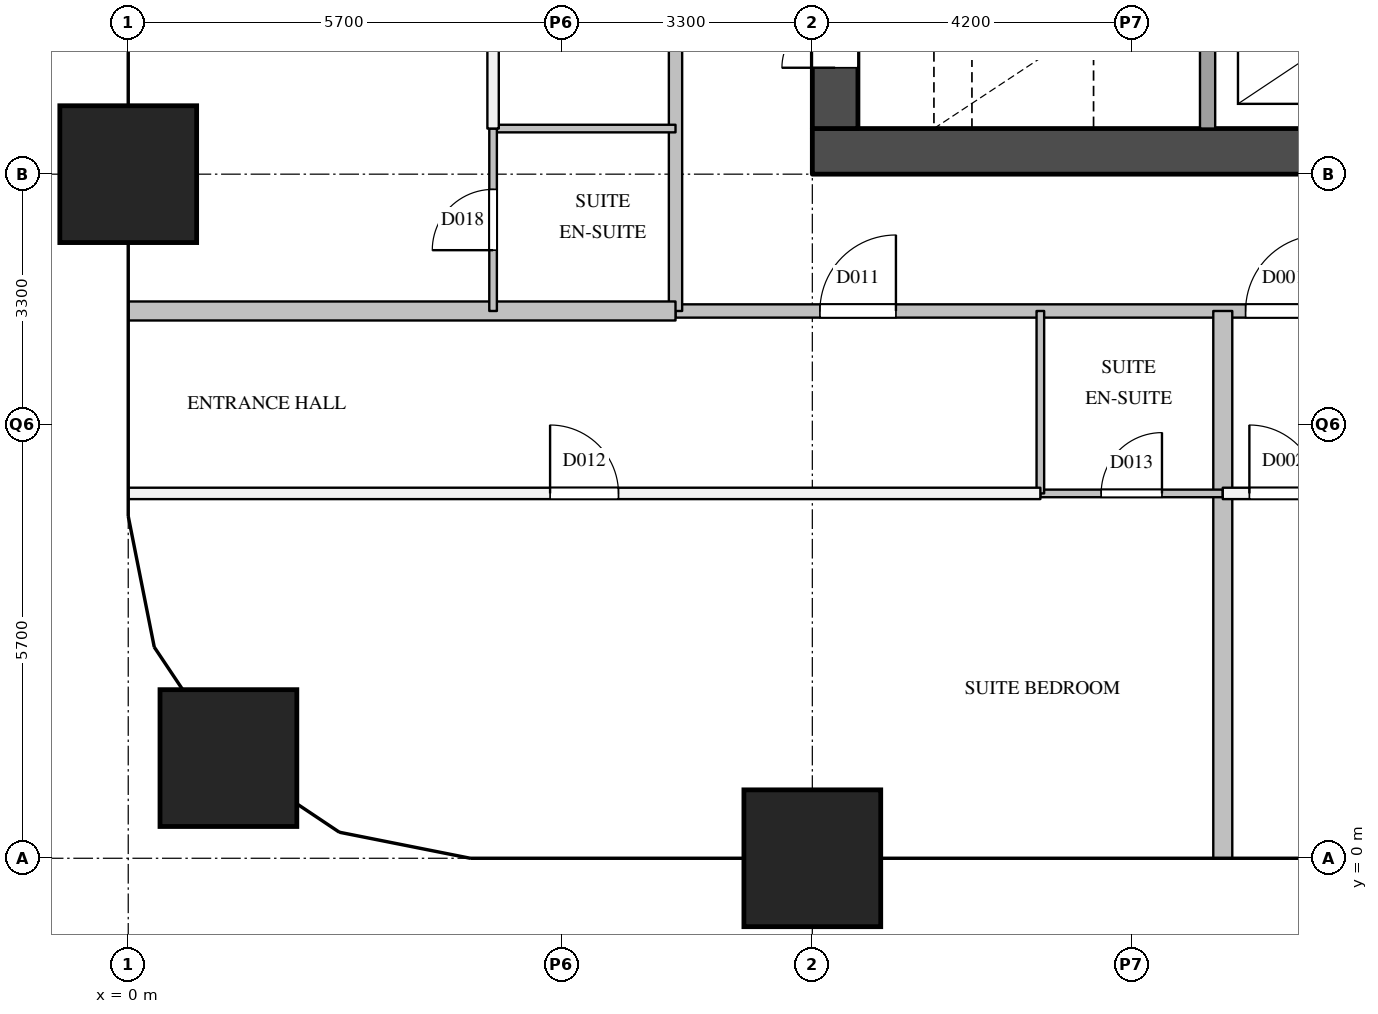
"""IFC4 building model, lengths in metres.
Left out: names, types, materials, properties, quantities, classifications, styles, units other than length and angle.
Written with IfcOpenShell. Run it as: python <this file> out.ifc"""

import sys

from ifc_helpers import new_model, si_unit, direction, frame, frame_2d, origin, origin_2d, place, context, subcontext, project, spatial, rectangle, extrude, element, fill, save


model = new_model("IFC4")
c1 = context("Model", 3, precision=1e-05, world=origin(), true_north=direction((0.0, 1.0)))
c2 = subcontext(c1, "Body", "Model", "MODEL_VIEW")
j1 = project(units=[si_unit("LENGTHUNIT", "METRE"), si_unit("PLANEANGLEUNIT", "RADIAN")], contexts=[c1])
p1 = place(None, origin())
s1 = spatial("IfcSite", under=j1, at=p1, CompositionType="ELEMENT")
p2 = place(p1, origin())
s2 = spatial("IfcBuilding", under=s1, at=p2, CompositionType="ELEMENT")
p3 = place(p2, frame((0.0, 0.0, 57.6)))
s3 = spatial("IfcBuildingStorey", under=s2, at=p3, CompositionType="ELEMENT", Elevation=57.6)
for number, where, z_axis, x_axis in (
    (1, (1.318, 1.318, 0.0), (0.0, 0.0, 1.0), (1.0, 0.0, 0.0)),
    (2, (0.0, 9.0, 0.0), (0.0, 0.0, 1.0), (1.0, 0.0, 0.0)),
    (3, (9.0, 0.0, 0.0), (0.0, 0.0, 1.0), (1.0, 0.0, 0.0)),
):
    element("IfcColumn", number, at=place(p3, frame(where, z_axis=z_axis, x_axis=x_axis)), inside=s3, PredefinedType="COLUMN", context=c2, shape_type="SweptSolid", body=[
        extrude(rectangle(XDim=1.8, YDim=1.8, at=origin_2d()), origin(), (0.0, 0.0, 1.0), 3.8),
    ])
p4 = place(p3, frame((9.0, 9.3, 0.0), z_axis=(0.0, 0.0, 1.0), x_axis=(1.0, 0.0, 0.0)))
e4 = element("IfcWall", 4, at=p4, inside=s3, PredefinedType="SHEAR", context=c2, shape_type="SweptSolid", body=[
    extrude(rectangle(XDim=9.0, YDim=0.6, at=frame_2d((4.5, 0.0))), origin(), (0.0, 0.0, 1.0), 3.5),
])
p5 = place(p3, frame((9.3, 9.6, 0.0), z_axis=(0.0, 0.0, 1.0), x_axis=(0.0, 1.0, 0.0)))
e5 = element("IfcWall", 5, at=p5, inside=s3, PredefinedType="SHEAR", context=c2, shape_type="SweptSolid", body=[
    extrude(rectangle(XDim=12.3, YDim=0.6, at=frame_2d((6.15, 0.0))), origin(), (0.0, 0.0, 1.0), 3.5),
])
p6 = place(p5, frame((0.8, 0.0, 0.0)))
e6 = element("IfcOpeningElement", 6, at=p6, cuts=e5, PredefinedType="OPENING", context=c2, shape_type="SweptSolid", body=[
    extrude(rectangle(XDim=0.7, YDim=2.1, at=frame_2d((0.35, 1.05))), frame((0.0, 0.31, 0.0), z_axis=(0.0, -1.0, 0.0), x_axis=(1.0, 0.0, 0.0)), (0.0, 0.0, 1.0), 0.62),
])
p7 = place(p5, frame((4.8, 0.0, 0.0)))
e7 = element("IfcOpeningElement", 7, at=p7, cuts=e5, PredefinedType="OPENING", context=c2, shape_type="SweptSolid", body=[
    extrude(rectangle(XDim=1.0, YDim=2.1, at=frame_2d((0.5, 1.05))), frame((0.0, 0.31, 0.0), z_axis=(0.0, -1.0, 0.0), x_axis=(1.0, 0.0, 0.0)), (0.0, 0.0, 1.0), 0.62),
])
p8 = place(p3, frame((14.2, 9.6, 0.0), z_axis=(0.0, 0.0, 1.0), x_axis=(0.0, 1.0, 0.0)))
e8 = element("IfcWall", 8, at=p8, inside=s3, PredefinedType="SOLIDWALL", context=c2, shape_type="SweptSolid", body=[
    extrude(rectangle(XDim=2.3, YDim=0.2, at=frame_2d((1.15, 0.0))), origin(), (0.0, 0.0, 1.0), 3.5),
])
p9 = place(p3, frame((7.2, 7.2, 0.0), z_axis=(0.0, 0.0, 1.0), x_axis=(1.0, 0.0, 0.0)))
e9 = element("IfcWall", 9, at=p9, inside=s3, PredefinedType="PARTITIONING", context=c2, shape_type="SweptSolid", body=[
    extrude(rectangle(XDim=12.6, YDim=0.175, at=frame_2d((6.3, 0.0))), origin(), (0.0, 0.0, 1.0), 3.5),
])
p10 = place(p9, frame((7.5, 0.0, 0.0)))
e10 = element("IfcOpeningElement", 10, at=p10, cuts=e9, PredefinedType="OPENING", context=c2, shape_type="SweptSolid", body=[
    extrude(rectangle(XDim=1.0, YDim=2.1, at=frame_2d((0.5, 1.05))), frame((0.0, 0.097, 0.0), z_axis=(0.0, -1.0, 0.0), x_axis=(1.0, 0.0, 0.0)), (0.0, 0.0, 1.0), 0.195),
])
p11 = place(p9, frame((1.9, 0.0, 0.0)))
e11 = element("IfcOpeningElement", 11, at=p11, cuts=e9, PredefinedType="OPENING", context=c2, shape_type="SweptSolid", body=[
    extrude(rectangle(XDim=1.0, YDim=2.1, at=frame_2d((0.5, 1.05))), frame((0.0, 0.097, 0.0), z_axis=(0.0, -1.0, 0.0), x_axis=(1.0, 0.0, 0.0)), (0.0, 0.0, 1.0), 0.195),
])
p12 = place(p3, frame((7.2, 7.2, 0.0), z_axis=(0.0, 0.0, 1.0), x_axis=(0.0, 1.0, 0.0)))
e12 = element("IfcWall", 12, at=p12, inside=s3, PredefinedType="PARTITIONING", context=c2, shape_type="SweptSolid", body=[
    extrude(rectangle(XDim=16.49, YDim=0.175, at=frame_2d((8.245, 0.0))), origin(), (0.0, 0.0, 1.0), 3.5),
])
p13 = place(p12, frame((6.1, 0.0, 0.0)))
e13 = element("IfcOpeningElement", 13, at=p13, cuts=e12, PredefinedType="OPENING", context=c2, shape_type="SweptSolid", body=[
    extrude(rectangle(XDim=1.0, YDim=2.1, at=frame_2d((0.5, 1.05))), frame((0.0, 0.097, 0.0), z_axis=(0.0, -1.0, 0.0), x_axis=(1.0, 0.0, 0.0)), (0.0, 0.0, 1.0), 0.195),
])
p14 = place(p12, frame((13.1, 0.0, 0.0)))
e14 = element("IfcOpeningElement", 14, at=p14, cuts=e12, PredefinedType="OPENING", context=c2, shape_type="SweptSolid", body=[
    extrude(rectangle(XDim=1.0, YDim=2.1, at=frame_2d((0.5, 1.05))), frame((0.0, 0.097, 0.0), z_axis=(0.0, -1.0, 0.0), x_axis=(1.0, 0.0, 0.0)), (0.0, 0.0, 1.0), 0.195),
])
p15 = place(p3, frame((0.0, 4.8, 0.0), z_axis=(0.0, 0.0, 1.0), x_axis=(1.0, 0.0, 0.0)))
e15 = element("IfcWall", 15, at=p15, inside=s3, PredefinedType="PARTITIONING", context=c2, shape_type="SweptSolid", body=[
    extrude(rectangle(XDim=12.0, YDim=0.15, at=frame_2d((6.0, 0.0))), origin(), (0.0, 0.0, 1.0), 2.5),
])
p16 = place(p15, frame((5.55, 0.0, 0.0)))
e16 = element("IfcOpeningElement", 16, at=p16, cuts=e15, PredefinedType="OPENING", context=c2, shape_type="SweptSolid", body=[
    extrude(rectangle(XDim=0.9, YDim=2.1, at=frame_2d((0.45, 1.05))), frame((0.0, 0.085, 0.0), z_axis=(0.0, -1.0, 0.0), x_axis=(1.0, 0.0, 0.0)), (0.0, 0.0, 1.0), 0.17),
])
p17 = place(p3, frame((14.4, 4.8, 0.0), z_axis=(0.0, 0.0, 1.0), x_axis=(1.0, 0.0, 0.0)))
e17 = element("IfcWall", 17, at=p17, inside=s3, PredefinedType="PARTITIONING", context=c2, shape_type="SweptSolid", body=[
    extrude(rectangle(XDim=1.6, YDim=0.15, at=frame_2d((0.8, 0.0))), origin(), (0.0, 0.0, 1.0), 3.5),
])
p18 = place(p17, frame((0.35, 0.0, 0.0)))
e18 = element("IfcOpeningElement", 18, at=p18, cuts=e17, PredefinedType="OPENING", context=c2, shape_type="SweptSolid", body=[
    extrude(rectangle(XDim=0.9, YDim=2.1, at=frame_2d((0.45, 1.05))), frame((0.0, 0.085, 0.0), z_axis=(0.0, -1.0, 0.0), x_axis=(1.0, 0.0, 0.0)), (0.0, 0.0, 1.0), 0.17),
])
p19 = place(p3, frame((4.8, 9.6, 0.0), z_axis=(0.0, 0.0, 1.0), x_axis=(0.0, 1.0, 0.0)))
e19 = element("IfcWall", 19, at=p19, inside=s3, PredefinedType="PARTITIONING", context=c2, shape_type="SweptSolid", body=[
    extrude(rectangle(XDim=8.4, YDim=0.15, at=frame_2d((4.2, 0.0))), origin(), (0.0, 0.0, 1.0), 3.5),
])
p20 = place(p19, frame((3.75, 0.0, 0.0)))
e20 = element("IfcOpeningElement", 20, at=p20, cuts=e19, PredefinedType="OPENING", context=c2, shape_type="SweptSolid", body=[
    extrude(rectangle(XDim=0.9, YDim=2.1, at=frame_2d((0.45, 1.05))), frame((0.0, 0.085, 0.0), z_axis=(0.0, -1.0, 0.0), x_axis=(1.0, 0.0, 0.0)), (0.0, 0.0, 1.0), 0.17),
])
for number, where, z_axis, x_axis in (
    (21, (0.0, 7.2, 0.0), (0.0, 0.0, 1.0), (1.0, 0.0, 0.0)),
    (22, (14.4, 0.0, 0.0), (0.0, 0.0, 1.0), (0.0, 1.0, 0.0)),
):
    element("IfcWall", number, at=place(p3, frame(where, z_axis=z_axis, x_axis=x_axis)), inside=s3, PredefinedType="PARTITIONING", context=c2, shape_type="SweptSolid", body=[
        extrude(rectangle(XDim=7.2, YDim=0.25, at=frame_2d((3.6, 0.0))), origin(), (0.0, 0.0, 1.0), 2.5),
    ])
p21 = place(p3, frame((12.0, 4.8, 0.0), z_axis=(0.0, 0.0, 1.0), x_axis=(1.0, 0.0, 0.0)))
e23 = element("IfcWall", 23, at=p21, inside=s3, PredefinedType="PARTITIONING", context=c2, shape_type="SweptSolid", body=[
    extrude(rectangle(XDim=2.4, YDim=0.1, at=frame_2d((1.2, 0.0))), origin(), (0.0, 0.0, 1.0), 3.5),
])
p22 = place(p21, frame((0.8, 0.0, 0.0)))
e24 = element("IfcOpeningElement", 24, at=p22, cuts=e23, PredefinedType="OPENING", context=c2, shape_type="SweptSolid", body=[
    extrude(rectangle(XDim=0.8, YDim=2.1, at=frame_2d((0.4, 1.05))), frame((0.0, 0.06, 0.0), z_axis=(0.0, -1.0, 0.0), x_axis=(1.0, 0.0, 0.0)), (0.0, 0.0, 1.0), 0.12),
])
p23 = place(p3, frame((4.8, 9.6, 0.0), z_axis=(0.0, 0.0, 1.0), x_axis=(1.0, 0.0, 0.0)))
e25 = element("IfcWall", 25, at=p23, inside=s3, PredefinedType="PARTITIONING", context=c2, shape_type="SweptSolid", body=[
    extrude(rectangle(XDim=2.4, YDim=0.1, at=frame_2d((1.2, 0.0))), origin(), (0.0, 0.0, 1.0), 3.5),
])
p24 = place(p3, frame((4.8, 7.2, 0.0), z_axis=(0.0, 0.0, 1.0), x_axis=(0.0, 1.0, 0.0)))
e26 = element("IfcWall", 26, at=p24, inside=s3, PredefinedType="PARTITIONING", context=c2, shape_type="SweptSolid", body=[
    extrude(rectangle(XDim=2.4, YDim=0.1, at=frame_2d((1.2, 0.0))), origin(), (0.0, 0.0, 1.0), 3.5),
])
p25 = place(p24, frame((0.8, 0.0, 0.0)))
e27 = element("IfcOpeningElement", 27, at=p25, cuts=e26, PredefinedType="OPENING", context=c2, shape_type="SweptSolid", body=[
    extrude(rectangle(XDim=0.8, YDim=2.1, at=frame_2d((0.4, 1.05))), frame((0.0, 0.06, 0.0), z_axis=(0.0, -1.0, 0.0), x_axis=(1.0, 0.0, 0.0)), (0.0, 0.0, 1.0), 0.12),
])
p26 = place(p3, frame((12.0, 4.8, 0.0), z_axis=(0.0, 0.0, 1.0), x_axis=(0.0, 1.0, 0.0)))
e28 = element("IfcWall", 28, at=p26, inside=s3, PredefinedType="PARTITIONING", context=c2, shape_type="SweptSolid", body=[
    extrude(rectangle(XDim=2.4, YDim=0.1, at=frame_2d((1.2, 0.0))), origin(), (0.0, 0.0, 1.0), 3.5),
])
p27 = place(p6, origin())
e29 = element("IfcDoor", 29, at=p27, inside=s3, OperationType="SINGLE_SWING_LEFT", PredefinedType="DOOR", context=c2, shape_type="SweptSolid", body=[
    extrude(rectangle(XDim=0.7, YDim=2.1, at=frame_2d((0.35, 1.05))), frame((0.0, 0.025, 0.0), z_axis=(0.0, -1.0, 0.0), x_axis=(1.0, 0.0, 0.0)), (0.0, 0.0, 1.0), 0.05),
])
fill(e6, e29)
p28 = place(p10, origin())
e30 = element("IfcDoor", 30, at=p28, inside=s3, OperationType="SINGLE_SWING_RIGHT", PredefinedType="DOOR", context=c2, shape_type="SweptSolid", body=[
    extrude(rectangle(XDim=1.0, YDim=2.1, at=frame_2d((0.5, 1.05))), frame((0.0, 0.025, 0.0), z_axis=(0.0, -1.0, 0.0), x_axis=(1.0, 0.0, 0.0)), (0.0, 0.0, 1.0), 0.05),
])
fill(e10, e30)
p29 = place(p18, origin())
e31 = element("IfcDoor", 31, at=p29, inside=s3, OperationType="SINGLE_SWING_LEFT", PredefinedType="DOOR", context=c2, shape_type="SweptSolid", body=[
    extrude(rectangle(XDim=0.9, YDim=2.1, at=frame_2d((0.45, 1.05))), frame((0.0, 0.025, 0.0), z_axis=(0.0, -1.0, 0.0), x_axis=(1.0, 0.0, 0.0)), (0.0, 0.0, 1.0), 0.05),
])
fill(e18, e31)
p30 = place(p11, origin())
e32 = element("IfcDoor", 32, at=p30, inside=s3, OperationType="SINGLE_SWING_RIGHT", PredefinedType="DOOR", context=c2, shape_type="SweptSolid", body=[
    extrude(rectangle(XDim=1.0, YDim=2.1, at=frame_2d((0.5, 1.05))), frame((0.0, 0.025, 0.0), z_axis=(0.0, -1.0, 0.0), x_axis=(1.0, 0.0, 0.0)), (0.0, 0.0, 1.0), 0.05),
])
fill(e11, e32)
p31 = place(p16, origin())
e33 = element("IfcDoor", 33, at=p31, inside=s3, OperationType="SINGLE_SWING_LEFT", PredefinedType="DOOR", context=c2, shape_type="SweptSolid", body=[
    extrude(rectangle(XDim=0.9, YDim=2.1, at=frame_2d((0.45, 1.05))), frame((0.0, 0.025, 0.0), z_axis=(0.0, -1.0, 0.0), x_axis=(1.0, 0.0, 0.0)), (0.0, 0.0, 1.0), 0.05),
])
fill(e16, e33)
p32 = place(p22, origin())
e34 = element("IfcDoor", 34, at=p32, inside=s3, OperationType="SINGLE_SWING_RIGHT", PredefinedType="DOOR", context=c2, shape_type="SweptSolid", body=[
    extrude(rectangle(XDim=0.8, YDim=2.1, at=frame_2d((0.4, 1.05))), frame((0.0, 0.025, 0.0), z_axis=(0.0, -1.0, 0.0), x_axis=(1.0, 0.0, 0.0)), (0.0, 0.0, 1.0), 0.05),
])
fill(e24, e34)
p33 = place(p25, origin())
e35 = element("IfcDoor", 35, at=p33, inside=s3, OperationType="SINGLE_SWING_LEFT", PredefinedType="DOOR", context=c2, shape_type="SweptSolid", body=[
    extrude(rectangle(XDim=0.8, YDim=2.1, at=frame_2d((0.4, 1.05))), frame((0.0, 0.025, 0.0), z_axis=(0.0, -1.0, 0.0), x_axis=(1.0, 0.0, 0.0)), (0.0, 0.0, 1.0), 0.05),
])
fill(e27, e35)
save(model, sys.argv[1])
